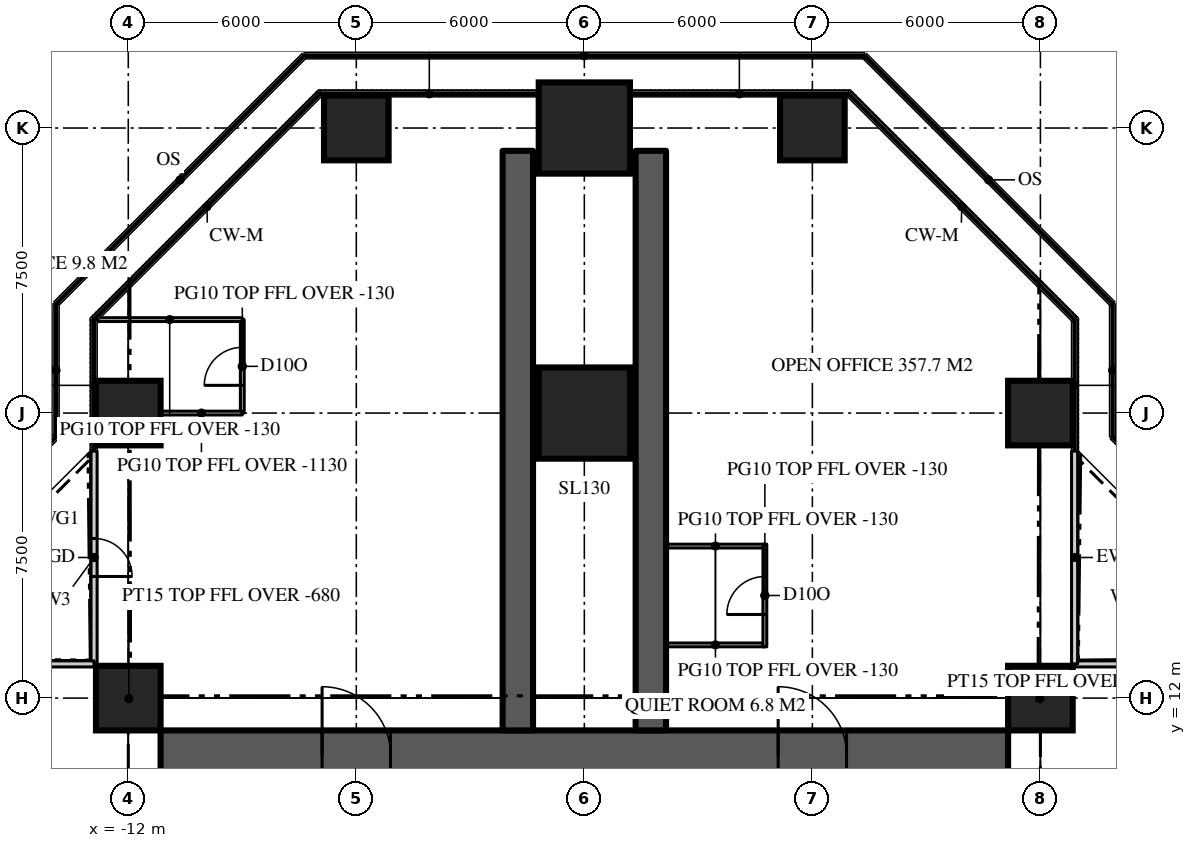
"""IFC4 building model, lengths in metres.
Left out: names, types, materials, properties, quantities, classifications, styles, units other than length and angle.
Written with IfcOpenShell. Run it as: python <this file> out.ifc"""

import sys

from ifc_helpers import new_model, si_unit, direction, frame, frame_2d, origin, origin_2d, place, context, subcontext, project, spatial, rectangle, extrude, element, fill, save


model = new_model("IFC4")
c1 = context("Model", 3, precision=1e-05, world=origin(), true_north=direction((0.0, 1.0)))
c2 = subcontext(c1, "Body", "Model", "MODEL_VIEW")
j1 = project(units=[si_unit("LENGTHUNIT", "METRE"), si_unit("PLANEANGLEUNIT", "RADIAN")], contexts=[c1])
p1 = place(None, origin())
s1 = spatial("IfcSite", under=j1, at=p1, CompositionType="ELEMENT")
p2 = place(p1, origin())
s2 = spatial("IfcBuilding", under=s1, at=p2, CompositionType="ELEMENT")
p3 = place(p2, frame((0.0, 0.0, 151.5)))
s3 = spatial("IfcBuildingStorey", under=s2, at=p3, CompositionType="ELEMENT", Elevation=151.5)
p4 = place(p3, frame((-11.15, 10.5, 0.0), z_axis=(0.0, 0.0, 1.0), x_axis=(1.0, 0.0, 0.0)))
e1 = element("IfcWall", 1, at=p4, inside=s3, PredefinedType="SHEAR", context=c2, shape_type="SweptSolid", body=[
    extrude(rectangle(XDim=22.3, YDim=1.3, at=frame_2d((11.15, 0.0))), origin(), (0.0, 0.0, 1.0), 3.9),
])
p5 = place(p4, frame((4.25, 0.0, 0.0)))
e2 = element("IfcOpeningElement", 2, at=p5, cuts=e1, PredefinedType="OPENING", context=c2, shape_type="SweptSolid", body=[
    extrude(rectangle(XDim=1.8, YDim=2.2, at=frame_2d((0.9, 1.1))), frame((0.0, 0.66, 0.0), z_axis=(0.0, -1.0, 0.0), x_axis=(1.0, 0.0, 0.0)), (0.0, 0.0, 1.0), 1.32),
])
p6 = place(p4, frame((16.25, 0.0, 0.0)))
e3 = element("IfcOpeningElement", 3, at=p6, cuts=e1, PredefinedType="OPENING", context=c2, shape_type="SweptSolid", body=[
    extrude(rectangle(XDim=1.8, YDim=2.2, at=frame_2d((0.9, 1.1))), frame((0.0, 0.66, 0.0), z_axis=(0.0, -1.0, 0.0), x_axis=(1.0, 0.0, 0.0)), (0.0, 0.0, 1.0), 1.32),
])
for number, where, z_axis, x_axis in (
    (4, (1.75, 11.15, 0.0), (0.0, 0.0, 1.0), (0.0, 1.0, 0.0)),
    (5, (-1.75, 11.15, 0.0), (0.0, 0.0, 1.0), (0.0, 1.0, 0.0)),
):
    element("IfcWall", number, at=place(p3, frame(where, z_axis=z_axis, x_axis=x_axis)), inside=s3, PredefinedType="SHEAR", context=c2, shape_type="SweptSolid", body=[
        extrude(rectangle(XDim=15.25, YDim=0.8, at=frame_2d((7.625, 0.0))), origin(), (0.0, 0.0, 1.0), 3.9),
    ])
for number, where, z_axis, x_axis in (
    (6, (-12.0, 12.0, 0.0), (0.0, 0.0, 1.0), (1.0, 0.0, 0.0)),
    (7, (12.0, 12.0, 0.0), (0.0, 0.0, 1.0), (1.0, 0.0, 0.0)),
    (8, (-12.0, 19.5, 0.0), (0.0, 0.0, 1.0), (1.0, 0.0, 0.0)),
):
    element("IfcColumn", number, at=place(p3, frame(where, z_axis=z_axis, x_axis=x_axis)), inside=s3, PredefinedType="COLUMN", context=c2, shape_type="SweptSolid", body=[
        extrude(rectangle(XDim=1.7, YDim=1.7, at=origin_2d()), origin(), (0.0, 0.0, 1.0), 3.9),
    ])
p7 = place(p3, frame((0.0, 19.5, 0.0), z_axis=(0.0, 0.0, 1.0), x_axis=(1.0, 0.0, 0.0)))
e9 = element("IfcColumn", 9, at=p7, inside=s3, PredefinedType="COLUMN", context=c2, shape_type="SweptSolid", body=[
    extrude(rectangle(XDim=2.4, YDim=2.4, at=origin_2d()), origin(), (0.0, 0.0, 1.0), 3.9),
])
for number, where, z_axis, x_axis in (
    (10, (12.0, 19.5, 0.0), (0.0, 0.0, 1.0), (1.0, 0.0, 0.0)),
    (11, (-6.0, 27.0, 0.0), (0.0, 0.0, 1.0), (1.0, 0.0, 0.0)),
):
    element("IfcColumn", number, at=place(p3, frame(where, z_axis=z_axis, x_axis=x_axis)), inside=s3, PredefinedType="COLUMN", context=c2, shape_type="SweptSolid", body=[
        extrude(rectangle(XDim=1.7, YDim=1.7, at=origin_2d()), origin(), (0.0, 0.0, 1.0), 3.9),
    ])
p8 = place(p3, frame((0.0, 27.0, 0.0), z_axis=(0.0, 0.0, 1.0), x_axis=(1.0, 0.0, 0.0)))
e12 = element("IfcColumn", 12, at=p8, inside=s3, PredefinedType="COLUMN", context=c2, shape_type="SweptSolid", body=[
    extrude(rectangle(XDim=2.4, YDim=2.4, at=origin_2d()), origin(), (0.0, 0.0, 1.0), 3.9),
])
p9 = place(p3, frame((6.0, 27.0, 0.0), z_axis=(0.0, 0.0, 1.0), x_axis=(1.0, 0.0, 0.0)))
e13 = element("IfcColumn", 13, at=p9, inside=s3, PredefinedType="COLUMN", context=c2, shape_type="SweptSolid", body=[
    extrude(rectangle(XDim=1.7, YDim=1.7, at=origin_2d()), origin(), (0.0, 0.0, 1.0), 3.9),
])
p10 = place(p3, frame((18.5, 12.9, 0.0), z_axis=(0.0, 0.0, 1.0), x_axis=(-1.0, 0.0, 0.0)))
e14 = element("IfcWall", 14, at=p10, inside=s3, PredefinedType="SOLIDWALL", context=c2, shape_type="SweptSolid", body=[
    extrude(rectangle(XDim=5.6, YDim=0.16, at=frame_2d((2.8, 0.0))), origin(), (0.0, 0.0, 1.0), 3.77),
])
p11 = place(p10, frame((2.3, 0.0, 0.0)))
e15 = element("IfcOpeningElement", 15, at=p11, cuts=e14, PredefinedType="OPENING", context=c2, shape_type="SweptSolid", body=[
    extrude(rectangle(XDim=1.0, YDim=2.2, at=frame_2d((0.5, 1.1))), frame((0.0, 0.09, 0.0), z_axis=(0.0, -1.0, 0.0), x_axis=(1.0, 0.0, 0.0)), (0.0, 0.0, 1.0), 0.18),
])
p12 = place(p3, frame((12.9, 12.9, 0.0), z_axis=(0.0, 0.0, 1.0), x_axis=(0.0, 1.0, 0.0)))
e16 = element("IfcWall", 16, at=p12, inside=s3, PredefinedType="SOLIDWALL", context=c2, shape_type="SweptSolid", body=[
    extrude(rectangle(XDim=5.6, YDim=0.16, at=frame_2d((2.8, 0.0))), origin(), (0.0, 0.0, 1.0), 3.77),
])
p13 = place(p3, frame((-12.9, 18.5, 0.0), z_axis=(0.0, 0.0, 1.0), x_axis=(0.0, -1.0, 0.0)))
e17 = element("IfcWall", 17, at=p13, inside=s3, PredefinedType="SOLIDWALL", context=c2, shape_type="SweptSolid", body=[
    extrude(rectangle(XDim=5.6, YDim=0.16, at=frame_2d((2.8, 0.0))), origin(), (0.0, 0.0, 1.0), 3.77),
])
p14 = place(p13, frame((2.3, 0.0, 0.0)))
e18 = element("IfcOpeningElement", 18, at=p14, cuts=e17, PredefinedType="OPENING", context=c2, shape_type="SweptSolid", body=[
    extrude(rectangle(XDim=1.0, YDim=2.2, at=frame_2d((0.5, 1.1))), frame((0.0, 0.09, 0.0), z_axis=(0.0, -1.0, 0.0), x_axis=(1.0, 0.0, 0.0)), (0.0, 0.0, 1.0), 0.18),
])
p15 = place(p3, frame((-12.9, 12.9, 0.0), z_axis=(0.0, 0.0, 1.0), x_axis=(-1.0, 0.0, 0.0)))
e19 = element("IfcWall", 19, at=p15, inside=s3, PredefinedType="SOLIDWALL", context=c2, shape_type="SweptSolid", body=[
    extrude(rectangle(XDim=5.6, YDim=0.16, at=frame_2d((2.8, 0.0))), origin(), (0.0, 0.0, 1.0), 3.77),
])
p16 = place(p3, frame((-9.0, 19.5, 0.0), z_axis=(0.0, 0.0, 1.0), x_axis=(0.0, 1.0, 0.0)))
e20 = element("IfcWall", 20, at=p16, inside=s3, PredefinedType="PARTITIONING", context=c2, shape_type="SweptSolid", body=[
    extrude(rectangle(XDim=2.459, YDim=0.1, at=frame_2d((1.229, 0.0))), origin(), (0.0, 0.0, 1.0), 3.77),
])
p17 = place(p16, frame((0.729, 0.0, 0.0)))
e21 = element("IfcOpeningElement", 21, at=p17, cuts=e20, PredefinedType="OPENING", context=c2, shape_type="SweptSolid", body=[
    extrude(rectangle(XDim=1.0, YDim=2.2, at=frame_2d((0.5, 1.1))), frame((0.0, 0.06, 0.0), z_axis=(0.0, -1.0, 0.0), x_axis=(1.0, 0.0, 0.0)), (0.0, 0.0, 1.0), 0.12),
])
p18 = place(p3, frame((-9.0, 19.5, 0.0), z_axis=(0.0, 0.0, 1.0), x_axis=(-1.0, 0.0, 0.0)))
e22 = element("IfcWall", 22, at=p18, inside=s3, PredefinedType="PARTITIONING", context=c2, shape_type="SweptSolid", body=[
    extrude(rectangle(XDim=2.15, YDim=0.1, at=frame_2d((1.075, 0.0))), origin(), (0.0, 0.0, 1.0), 2.77),
])
p19 = place(p3, frame((-9.0, 21.959, 0.0), z_axis=(0.0, 0.0, 1.0), x_axis=(-1.0, 0.0, 0.0)))
e23 = element("IfcWall", 23, at=p19, inside=s3, PredefinedType="PARTITIONING", context=c2, shape_type="SweptSolid", body=[
    extrude(rectangle(XDim=3.82, YDim=0.1, at=frame_2d((1.91, 0.0))), origin(), (0.0, 0.0, 1.0), 3.77),
])
for number, where, z_axis, x_axis in (
    (24, (2.15, 13.4, 0.0), (0.0, 0.0, 1.0), (1.0, 0.0, 0.0)),
    (25, (2.15, 16.0, 0.0), (0.0, 0.0, 1.0), (1.0, 0.0, 0.0)),
):
    element("IfcWall", number, at=place(p3, frame(where, z_axis=z_axis, x_axis=x_axis)), inside=s3, PredefinedType="PARTITIONING", context=c2, shape_type="SweptSolid", body=[
        extrude(rectangle(XDim=2.6, YDim=0.1, at=frame_2d((1.3, 0.0))), origin(), (0.0, 0.0, 1.0), 3.77),
    ])
p20 = place(p3, frame((4.75, 13.35, 0.0), z_axis=(0.0, 0.0, 1.0), x_axis=(0.0, 1.0, 0.0)))
e26 = element("IfcWall", 26, at=p20, inside=s3, PredefinedType="PARTITIONING", context=c2, shape_type="SweptSolid", body=[
    extrude(rectangle(XDim=2.7, YDim=0.1, at=frame_2d((1.35, 0.0))), origin(), (0.0, 0.0, 1.0), 3.77),
])
p21 = place(p20, frame((0.85, 0.0, 0.0)))
e27 = element("IfcOpeningElement", 27, at=p21, cuts=e26, PredefinedType="OPENING", context=c2, shape_type="SweptSolid", body=[
    extrude(rectangle(XDim=1.0, YDim=2.2, at=frame_2d((0.5, 1.1))), frame((0.0, 0.06, 0.0), z_axis=(0.0, -1.0, 0.0), x_axis=(1.0, 0.0, 0.0)), (0.0, 0.0, 1.0), 0.12),
])
for number, where, z_axis, x_axis in (
    (28, (11.15, 11.15, 0.0), (0.0, 0.0, 1.0), (0.707, 0.707, 0.0)),
    (29, (-11.15, 11.15, 0.0), (0.0, 0.0, 1.0), (-0.707, 0.707, 0.0)),
):
    element("IfcWall", number, at=place(p3, frame(where, z_axis=z_axis, x_axis=x_axis)), inside=s3, PredefinedType="PARTITIONING", context=c2, shape_type="SweptSolid", body=[
        extrude(rectangle(XDim=2.362, YDim=0.15, at=frame_2d((1.181, 0.0))), origin(), (0.0, 0.0, 1.0), 3.22),
    ])
p22 = place(p14, origin())
e30 = element("IfcDoor", 30, at=p22, inside=s3, OperationType="SINGLE_SWING_RIGHT", PredefinedType="DOOR", context=c2, shape_type="SweptSolid", body=[
    extrude(rectangle(XDim=1.0, YDim=2.2, at=frame_2d((0.5, 1.1))), frame((0.0, 0.025, 0.0), z_axis=(0.0, -1.0, 0.0), x_axis=(1.0, 0.0, 0.0)), (0.0, 0.0, 1.0), 0.05),
])
fill(e18, e30)
p23 = place(p5, origin())
e31 = element("IfcDoor", 31, at=p23, inside=s3, OperationType="DOUBLE_DOOR_DOUBLE_SWING", PredefinedType="DOOR", context=c2, shape_type="SweptSolid", body=[
    extrude(rectangle(XDim=1.8, YDim=2.2, at=frame_2d((0.9, 1.1))), frame((0.0, 0.025, 0.0), z_axis=(0.0, -1.0, 0.0), x_axis=(1.0, 0.0, 0.0)), (0.0, 0.0, 1.0), 0.05),
])
fill(e2, e31)
p24 = place(p6, origin())
e32 = element("IfcDoor", 32, at=p24, inside=s3, OperationType="DOUBLE_DOOR_DOUBLE_SWING", PredefinedType="DOOR", context=c2, shape_type="SweptSolid", body=[
    extrude(rectangle(XDim=1.8, YDim=2.2, at=frame_2d((0.9, 1.1))), frame((0.0, 0.025, 0.0), z_axis=(0.0, -1.0, 0.0), x_axis=(1.0, 0.0, 0.0)), (0.0, 0.0, 1.0), 0.05),
])
fill(e3, e32)
p25 = place(p17, origin())
e33 = element("IfcDoor", 33, at=p25, inside=s3, OperationType="SINGLE_SWING_LEFT", PredefinedType="DOOR", context=c2, shape_type="SweptSolid", body=[
    extrude(rectangle(XDim=1.0, YDim=2.2, at=frame_2d((0.5, 1.1))), frame((0.0, 0.025, 0.0), z_axis=(0.0, -1.0, 0.0), x_axis=(1.0, 0.0, 0.0)), (0.0, 0.0, 1.0), 0.05),
])
fill(e21, e33)
p26 = place(p21, origin())
e34 = element("IfcDoor", 34, at=p26, inside=s3, OperationType="SINGLE_SWING_LEFT", PredefinedType="DOOR", context=c2, shape_type="SweptSolid", body=[
    extrude(rectangle(XDim=1.0, YDim=2.2, at=frame_2d((0.5, 1.1))), frame((0.0, 0.025, 0.0), z_axis=(0.0, -1.0, 0.0), x_axis=(1.0, 0.0, 0.0)), (0.0, 0.0, 1.0), 0.05),
])
fill(e27, e34)
save(model, sys.argv[1])
